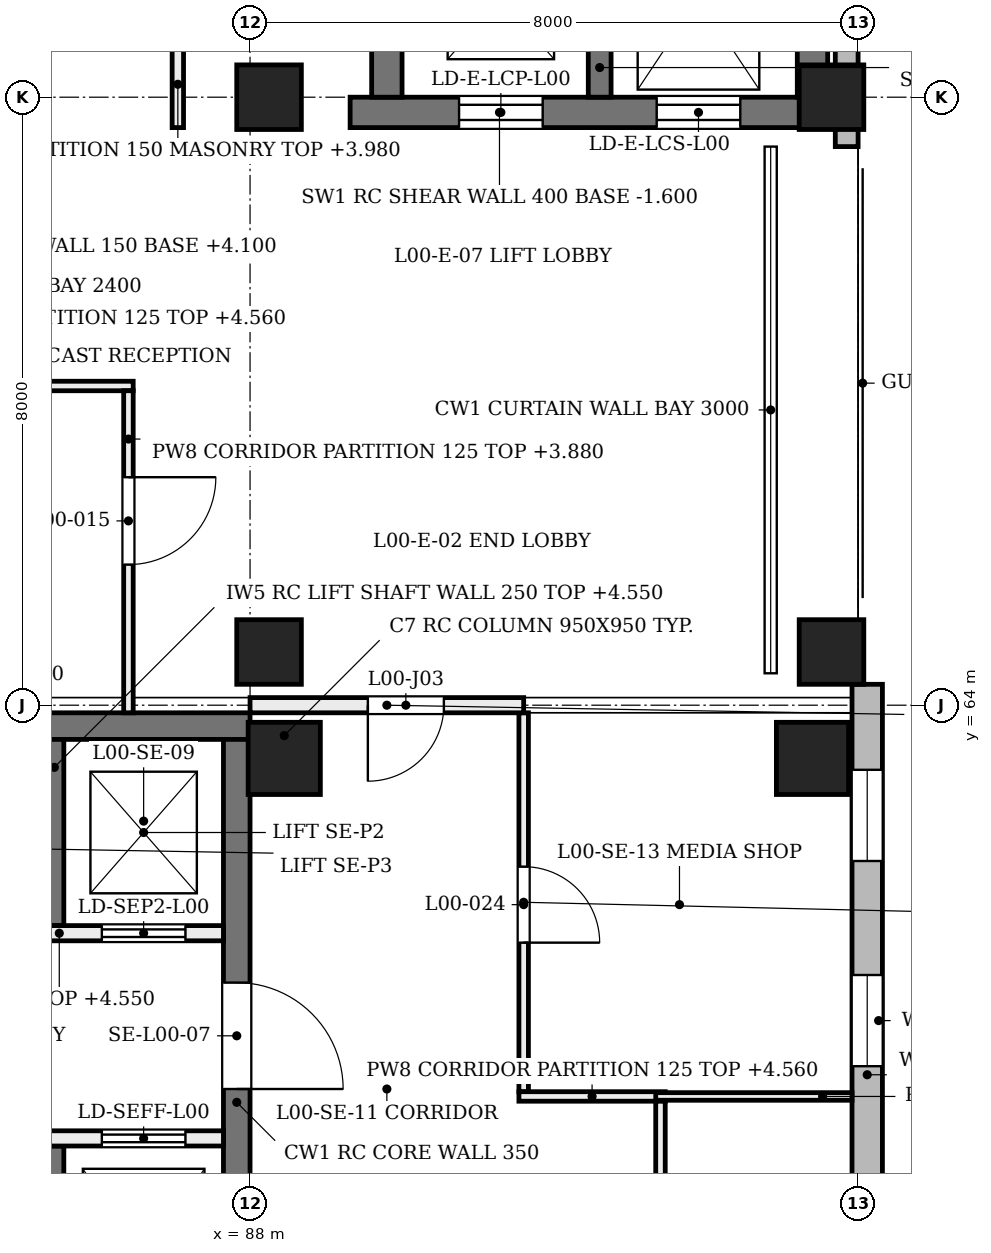
"""IFC4 building model, lengths in metres.
Left out: names, types, materials, properties, quantities, classifications, styles, units other than length and angle.
Written with IfcOpenShell. Run it as: python <this file> out.ifc"""

import sys

from ifc_helpers import new_model, si_unit, direction, frame, frame_2d, origin, origin_2d, place, context, subcontext, project, spatial, rectangle, extrude, element, fill, save


model = new_model("IFC4")
c1 = context("Model", 3, precision=1e-05, world=origin(), true_north=direction((0.0, 1.0)))
c2 = subcontext(c1, "Body", "Model", "MODEL_VIEW")
j1 = project(units=[si_unit("LENGTHUNIT", "METRE"), si_unit("PLANEANGLEUNIT", "RADIAN")], contexts=[c1])
p1 = place(None, origin())
s1 = spatial("IfcSite", under=j1, at=p1, CompositionType="ELEMENT")
p2 = place(p1, origin())
s2 = spatial("IfcBuilding", under=s1, at=p2, CompositionType="ELEMENT")
p3 = place(p2, origin())
s3 = spatial("IfcBuildingStorey", under=s2, at=p3, CompositionType="ELEMENT", Elevation=0.0)
p4 = place(p3, frame((89.317, 71.8, -1.6), z_axis=(0.0, 0.0, 1.0), x_axis=(1.0, 0.0, 0.0)))
e1 = element("IfcWall", 1, at=p4, inside=s3, PredefinedType="SHEAR", context=c2, shape_type="SweptSolid", body=[
    extrude(rectangle(XDim=6.55, YDim=0.4, at=frame_2d((3.275, 0.0))), origin(), (0.0, 0.0, 1.0), 6.18),
])
p5 = place(p4, frame((1.433, 0.0, 1.6)))
e2 = element("IfcOpeningElement", 2, at=p5, cuts=e1, PredefinedType="OPENING", context=c2, shape_type="SweptSolid", body=[
    extrude(rectangle(XDim=1.1, YDim=2.1, at=frame_2d((0.55, 1.05))), frame((0.0, 0.21, 0.0), z_axis=(0.0, -1.0, 0.0), x_axis=(1.0, 0.0, 0.0)), (0.0, 0.0, 1.0), 0.42),
])
p6 = place(p4, frame((4.033, 0.0, 1.6)))
e3 = element("IfcOpeningElement", 3, at=p6, cuts=e1, PredefinedType="OPENING", context=c2, shape_type="SweptSolid", body=[
    extrude(rectangle(XDim=1.1, YDim=2.1, at=frame_2d((0.55, 1.05))), frame((0.0, 0.21, 0.0), z_axis=(0.0, -1.0, 0.0), x_axis=(1.0, 0.0, 0.0)), (0.0, 0.0, 1.0), 0.42),
])
for number, where, z_axis, x_axis in (
    (4, (89.8, 72.0, -1.6), (0.0, 0.0, 1.0), (0.0, 1.0, 0.0)),
    (5, (95.4, 72.0, -1.6), (0.0, 0.0, 1.0), (0.0, 1.0, 0.0)),
):
    element("IfcWall", number, at=place(p3, frame(where, z_axis=z_axis, x_axis=x_axis)), inside=s3, PredefinedType="SHEAR", context=c2, shape_type="SweptSolid", body=[
        extrude(rectangle(XDim=2.6, YDim=0.4, at=frame_2d((1.3, 0.0))), origin(), (0.0, 0.0, 1.0), 6.18),
    ])
p7 = place(p3, frame((92.6, 72.0, -1.6), z_axis=(0.0, 0.0, 1.0), x_axis=(0.0, 1.0, 0.0)))
e6 = element("IfcWall", 6, at=p7, inside=s3, PredefinedType="SHEAR", context=c2, shape_type="SweptSolid", body=[
    extrude(rectangle(XDim=2.6, YDim=0.3, at=frame_2d((1.3, 0.0))), origin(), (0.0, 0.0, 1.0), 6.18),
])
p8 = place(p3, frame((79.725, 63.725, 0.0), z_axis=(0.0, 0.0, 1.0), x_axis=(1.0, 0.0, 0.0)))
e7 = element("IfcWall", 7, at=p8, inside=s3, PredefinedType="SHEAR", context=c2, shape_type="SweptSolid", body=[
    extrude(rectangle(XDim=8.275, YDim=0.35, at=frame_2d((4.137, 0.0))), origin(), (0.0, 0.0, 1.0), 4.58),
])
p9 = place(p3, frame((87.825, 48.35, 0.0), z_axis=(0.0, 0.0, 1.0), x_axis=(0.0, 1.0, 0.0)))
e8 = element("IfcWall", 8, at=p9, inside=s3, PredefinedType="SHEAR", context=c2, shape_type="SweptSolid", body=[
    extrude(rectangle(XDim=15.2, YDim=0.35, at=frame_2d((7.6, 0.0))), origin(), (0.0, 0.0, 1.0), 4.58),
])
p10 = place(p9, frame((0.95, 0.0, 0.0)))
e9 = element("IfcOpeningElement", 9, at=p10, cuts=e8, PredefinedType="OPENING", context=c2, shape_type="SweptSolid", body=[
    extrude(rectangle(XDim=1.0, YDim=2.1, at=frame_2d((0.5, 1.05))), frame((0.0, 0.185, 0.0), z_axis=(0.0, -1.0, 0.0), x_axis=(1.0, 0.0, 0.0)), (0.0, 0.0, 1.0), 0.37),
])
p11 = place(p9, frame((10.6, 0.0, 0.0)))
e10 = element("IfcOpeningElement", 10, at=p11, cuts=e8, PredefinedType="OPENING", context=c2, shape_type="SweptSolid", body=[
    extrude(rectangle(XDim=1.4, YDim=2.1, at=frame_2d((0.7, 1.05))), frame((0.0, 0.185, 0.0), z_axis=(0.0, -1.0, 0.0), x_axis=(1.0, 0.0, 0.0)), (0.0, 0.0, 1.0), 0.37),
])
for number, where, z_axis, x_axis in (
    (11, (88.45, 63.3, 0.0), (0.0, 0.0, 1.0), (1.0, 0.0, 0.0)),
    (12, (95.4, 63.3, 0.0), (0.0, 0.0, 1.0), (1.0, 0.0, 0.0)),
):
    element("IfcColumn", number, at=place(p3, frame(where, z_axis=z_axis, x_axis=x_axis)), inside=s3, PredefinedType="COLUMN", context=c2, shape_type="SweptSolid", body=[
        extrude(rectangle(XDim=0.95, YDim=0.95, at=origin_2d()), origin(), (0.0, 0.0, 1.0), 4.8),
    ])
for number, where, z_axis, x_axis in (
    (13, (87.667, 64.7, -1.6), (0.204, 0.0, 0.979), (0.0, 1.0, 0.0)),
    (14, (87.667, 72.0, -1.6), (0.204, 0.0, 0.979), (0.0, 1.0, 0.0)),
    (15, (95.067, 64.7, -1.6), (0.204, 0.0, 0.979), (0.0, 1.0, 0.0)),
    (16, (95.067, 72.0, -1.6), (0.204, 0.0, 0.979), (0.0, 1.0, 0.0)),
):
    element("IfcColumn", number, at=place(p3, frame(where, z_axis=z_axis, x_axis=x_axis)), inside=s3, PredefinedType="COLUMN", context=c2, shape_type="SweptSolid", body=[
        extrude(rectangle(XDim=0.85, YDim=0.85, at=origin_2d()), origin(), (0.0, 0.0, 1.0), 6.538),
    ])
p12 = place(p3, frame((95.85, 71.35, 0.0), z_axis=(0.0, 0.0, 1.0), x_axis=(0.0, 1.0, 0.0)))
e17 = element("IfcWall", 17, at=p12, inside=s3, PredefinedType="SOLIDWALL", context=c2, shape_type="SweptSolid", body=[
    extrude(rectangle(XDim=20.7, YDim=0.3, at=frame_2d((10.35, 0.0))), origin(), (0.0, 0.0, 1.0), 3.9),
])
p13 = place(p3, frame((96.12, 47.7, 0.0), z_axis=(0.0, 0.0, 1.0), x_axis=(0.0, 1.0, 0.0)))
e18 = element("IfcWall", 18, at=p13, inside=s3, PredefinedType="SOLIDWALL", context=c2, shape_type="SweptSolid", body=[
    extrude(rectangle(XDim=16.575, YDim=0.4, at=frame_2d((8.288, 0.0))), origin(), (0.0, 0.0, 1.0), 3.9),
])
p14 = place(p13, frame((0.75, 0.0, 1.9)))
e19 = element("IfcOpeningElement", 19, at=p14, cuts=e18, PredefinedType="OPENING", context=c2, shape_type="SweptSolid", body=[
    extrude(rectangle(XDim=1.2, YDim=1.5, at=frame_2d((0.6, 0.75))), frame((0.0, 0.21, 0.0), z_axis=(0.0, -1.0, 0.0), x_axis=(1.0, 0.0, 0.0)), (0.0, 0.0, 1.0), 0.42),
])
p15 = place(p13, frame((3.45, 0.0, 1.9)))
e20 = element("IfcOpeningElement", 20, at=p15, cuts=e18, PredefinedType="OPENING", context=c2, shape_type="SweptSolid", body=[
    extrude(rectangle(XDim=1.2, YDim=1.5, at=frame_2d((0.6, 0.75))), frame((0.0, 0.21, 0.0), z_axis=(0.0, -1.0, 0.0), x_axis=(1.0, 0.0, 0.0)), (0.0, 0.0, 1.0), 0.42),
])
p16 = place(p13, frame((6.15, 0.0, 1.9)))
e21 = element("IfcOpeningElement", 21, at=p16, cuts=e18, PredefinedType="OPENING", context=c2, shape_type="SweptSolid", body=[
    extrude(rectangle(XDim=1.2, YDim=1.5, at=frame_2d((0.6, 0.75))), frame((0.0, 0.21, 0.0), z_axis=(0.0, -1.0, 0.0), x_axis=(1.0, 0.0, 0.0)), (0.0, 0.0, 1.0), 0.42),
])
p17 = place(p13, frame((8.85, 0.0, 1.9)))
e22 = element("IfcOpeningElement", 22, at=p17, cuts=e18, PredefinedType="OPENING", context=c2, shape_type="SweptSolid", body=[
    extrude(rectangle(XDim=1.2, YDim=1.5, at=frame_2d((0.6, 0.75))), frame((0.0, 0.21, 0.0), z_axis=(0.0, -1.0, 0.0), x_axis=(1.0, 0.0, 0.0)), (0.0, 0.0, 1.0), 0.42),
])
p18 = place(p13, frame((11.55, 0.0, 1.9)))
e23 = element("IfcOpeningElement", 23, at=p18, cuts=e18, PredefinedType="OPENING", context=c2, shape_type="SweptSolid", body=[
    extrude(rectangle(XDim=1.2, YDim=1.5, at=frame_2d((0.6, 0.75))), frame((0.0, 0.21, 0.0), z_axis=(0.0, -1.0, 0.0), x_axis=(1.0, 0.0, 0.0)), (0.0, 0.0, 1.0), 0.42),
])
p19 = place(p13, frame((14.25, 0.0, 1.9)))
e24 = element("IfcOpeningElement", 24, at=p19, cuts=e18, PredefinedType="OPENING", context=c2, shape_type="SweptSolid", body=[
    extrude(rectangle(XDim=1.2, YDim=1.5, at=frame_2d((0.6, 0.75))), frame((0.0, 0.21, 0.0), z_axis=(0.0, -1.0, 0.0), x_axis=(1.0, 0.0, 0.0)), (0.0, 0.0, 1.0), 0.42),
])
p20 = place(p3, frame((85.425, 55.2, 0.0), z_axis=(0.0, 0.0, 1.0), x_axis=(0.0, 1.0, 0.0)))
e25 = element("IfcWall", 25, at=p20, inside=s3, PredefinedType="SOLIDWALL", context=c2, shape_type="SweptSolid", body=[
    extrude(rectangle(XDim=3.0, YDim=0.25, at=frame_2d((1.5, 0.0))), origin(), (0.0, 0.0, 1.0), 4.55),
])
p21 = place(p3, frame((85.425, 61.1, 0.0), z_axis=(0.0, 0.0, 1.0), x_axis=(0.0, 1.0, 0.0)))
e26 = element("IfcWall", 26, at=p21, inside=s3, PredefinedType="SOLIDWALL", context=c2, shape_type="SweptSolid", body=[
    extrude(rectangle(XDim=2.45, YDim=0.25, at=frame_2d((1.225, 0.0))), origin(), (0.0, 0.0, 1.0), 4.55),
])
p22 = place(p3, frame((87.65, 58.3, 0.0), z_axis=(0.0, 0.0, 1.0), x_axis=(-1.0, 0.0, 0.0)))
e27 = element("IfcWall", 27, at=p22, inside=s3, PredefinedType="SOLIDWALL", context=c2, shape_type="SweptSolid", body=[
    extrude(rectangle(XDim=7.2, YDim=0.2, at=frame_2d((3.6, 0.0))), origin(), (0.0, 0.0, 1.0), 4.55),
])
p23 = place(p22, frame((0.5, 0.0, 0.0)))
e28 = element("IfcOpeningElement", 28, at=p23, cuts=e27, PredefinedType="OPENING", context=c2, shape_type="SweptSolid", body=[
    extrude(rectangle(XDim=1.1, YDim=2.1, at=frame_2d((0.55, 1.05))), frame((0.0, 0.11, 0.0), z_axis=(0.0, -1.0, 0.0), x_axis=(1.0, 0.0, 0.0)), (0.0, 0.0, 1.0), 0.22),
])
p24 = place(p22, frame((5.6, 0.0, 0.0)))
e29 = element("IfcOpeningElement", 29, at=p24, cuts=e27, PredefinedType="OPENING", context=c2, shape_type="SweptSolid", body=[
    extrude(rectangle(XDim=1.1, YDim=2.1, at=frame_2d((0.55, 1.05))), frame((0.0, 0.11, 0.0), z_axis=(0.0, -1.0, 0.0), x_axis=(1.0, 0.0, 0.0)), (0.0, 0.0, 1.0), 0.22),
])
p25 = place(p22, frame((3.1, 0.0, 0.0)))
e30 = element("IfcOpeningElement", 30, at=p25, cuts=e27, PredefinedType="OPENING", context=c2, shape_type="SweptSolid", body=[
    extrude(rectangle(XDim=1.0, YDim=2.1, at=frame_2d((0.5, 1.05))), frame((0.0, 0.11, 0.0), z_axis=(0.0, -1.0, 0.0), x_axis=(1.0, 0.0, 0.0)), (0.0, 0.0, 1.0), 0.22),
])
p26 = place(p3, frame((87.65, 61.0, 0.0), z_axis=(0.0, 0.0, 1.0), x_axis=(-1.0, 0.0, 0.0)))
e31 = element("IfcWall", 31, at=p26, inside=s3, PredefinedType="SOLIDWALL", context=c2, shape_type="SweptSolid", body=[
    extrude(rectangle(XDim=7.2, YDim=0.2, at=frame_2d((3.6, 0.0))), origin(), (0.0, 0.0, 1.0), 4.55),
])
p27 = place(p26, frame((0.5, 0.0, 0.0)))
e32 = element("IfcOpeningElement", 32, at=p27, cuts=e31, PredefinedType="OPENING", context=c2, shape_type="SweptSolid", body=[
    extrude(rectangle(XDim=1.1, YDim=2.1, at=frame_2d((0.55, 1.05))), frame((0.0, 0.11, 0.0), z_axis=(0.0, -1.0, 0.0), x_axis=(1.0, 0.0, 0.0)), (0.0, 0.0, 1.0), 0.22),
])
p28 = place(p26, frame((5.6, 0.0, 0.0)))
e33 = element("IfcOpeningElement", 33, at=p28, cuts=e31, PredefinedType="OPENING", context=c2, shape_type="SweptSolid", body=[
    extrude(rectangle(XDim=1.1, YDim=2.1, at=frame_2d((0.55, 1.05))), frame((0.0, 0.11, 0.0), z_axis=(0.0, -1.0, 0.0), x_axis=(1.0, 0.0, 0.0)), (0.0, 0.0, 1.0), 0.22),
])
p29 = place(p26, frame((3.1, 0.0, 0.0)))
e34 = element("IfcOpeningElement", 34, at=p29, cuts=e31, PredefinedType="OPENING", context=c2, shape_type="SweptSolid", body=[
    extrude(rectangle(XDim=1.0, YDim=2.1, at=frame_2d((0.5, 1.05))), frame((0.0, 0.11, 0.0), z_axis=(0.0, -1.0, 0.0), x_axis=(1.0, 0.0, 0.0)), (0.0, 0.0, 1.0), 0.22),
])
p30 = place(p3, frame((82.23, 68.2, 0.0), z_axis=(0.0, 0.0, 1.0), x_axis=(1.0, 0.0, 0.0)))
e35 = element("IfcWall", 35, at=p30, inside=s3, PredefinedType="PARTITIONING", context=c2, shape_type="SweptSolid", body=[
    extrude(rectangle(XDim=4.232, YDim=0.125, at=frame_2d((2.116, 0.0))), origin(), (0.0, 0.0, 1.0), 4.56),
])
p31 = place(p3, frame((86.4, 63.9, 0.0), z_axis=(0.0, 0.0, 1.0), x_axis=(0.0, 1.0, 0.0)))
e36 = element("IfcWall", 36, at=p31, inside=s3, PredefinedType="PARTITIONING", context=c2, shape_type="SweptSolid", body=[
    extrude(rectangle(XDim=4.238, YDim=0.125, at=frame_2d((2.119, 0.0))), origin(), (0.0, 0.0, 1.0), 3.88),
])
p32 = place(p31, frame((1.95, 0.0, 0.0)))
e37 = element("IfcOpeningElement", 37, at=p32, cuts=e36, PredefinedType="OPENING", context=c2, shape_type="SweptSolid", body=[
    extrude(rectangle(XDim=1.15, YDim=2.1, at=frame_2d((0.575, 1.05))), frame((0.0, 0.073, 0.0), z_axis=(0.0, -1.0, 0.0), x_axis=(1.0, 0.0, 0.0)), (0.0, 0.0, 1.0), 0.145),
])
p33 = place(p3, frame((87.05, 71.6, 0.0), z_axis=(0.0, 0.0, 1.0), x_axis=(0.0, 1.0, 0.0)))
e38 = element("IfcWall", 38, at=p33, inside=s3, PredefinedType="PARTITIONING", context=c2, shape_type="SweptSolid", body=[
    extrude(rectangle(XDim=3.8, YDim=0.15, at=frame_2d((1.9, 0.0))), origin(), (0.0, 0.0, 1.0), 3.98),
])
p34 = place(p33, frame((1.225, 0.0, 0.0)))
e39 = element("IfcOpeningElement", 39, at=p34, cuts=e38, PredefinedType="OPENING", context=c2, shape_type="SweptSolid", body=[
    extrude(rectangle(XDim=0.95, YDim=2.1, at=frame_2d((0.475, 1.05))), frame((0.0, 0.085, 0.0), z_axis=(0.0, -1.0, 0.0), x_axis=(1.0, 0.0, 0.0)), (0.0, 0.0, 1.0), 0.17),
])
p35 = place(p3, frame((91.6, 58.914, 0.0), z_axis=(0.0, 0.0, 1.0), x_axis=(0.0, 1.0, 0.0)))
e40 = element("IfcWall", 40, at=p35, inside=s3, PredefinedType="PARTITIONING", context=c2, shape_type="SweptSolid", body=[
    extrude(rectangle(XDim=4.986, YDim=0.125, at=frame_2d((2.493, 0.0))), origin(), (0.0, 0.0, 1.0), 3.88),
])
p36 = place(p35, frame((1.962, 0.0, 0.0)))
e41 = element("IfcOpeningElement", 41, at=p36, cuts=e40, PredefinedType="OPENING", context=c2, shape_type="SweptSolid", body=[
    extrude(rectangle(XDim=1.0, YDim=2.1, at=frame_2d((0.5, 1.05))), frame((0.0, 0.073, 0.0), z_axis=(0.0, -1.0, 0.0), x_axis=(1.0, 0.0, 0.0)), (0.0, 0.0, 1.0), 0.145),
])
p37 = place(p3, frame((91.538, 58.852, 0.0), z_axis=(0.0, 0.0, 1.0), x_axis=(1.0, 0.0, 0.0)))
e42 = element("IfcWall", 42, at=p37, inside=s3, PredefinedType="PARTITIONING", context=c2, shape_type="SweptSolid", body=[
    extrude(rectangle(XDim=1.925, YDim=0.125, at=frame_2d((0.962, 0.0))), origin(), (0.0, 0.0, 1.0), 4.56),
])
p38 = place(p3, frame((93.337, 58.852, 0.0), z_axis=(0.0, 0.0, 1.0), x_axis=(1.0, 0.0, 0.0)))
e43 = element("IfcWall", 43, at=p38, inside=s3, PredefinedType="PARTITIONING", context=c2, shape_type="SweptSolid", body=[
    extrude(rectangle(XDim=2.583, YDim=0.1, at=frame_2d((1.291, 0.0))), origin(), (0.0, 0.0, 1.0), 3.88),
])
p39 = place(p3, frame((93.4, 52.654, 0.0), z_axis=(0.0, 0.0, 1.0), x_axis=(0.0, 1.0, 0.0)))
e44 = element("IfcWall", 44, at=p39, inside=s3, PredefinedType="PARTITIONING", context=c2, shape_type="SweptSolid", body=[
    extrude(rectangle(XDim=6.135, YDim=0.125, at=frame_2d((3.068, 0.0))), origin(), (0.0, 0.0, 1.0), 3.98),
])
p40 = place(p39, frame((1.052, 0.0, 0.0)))
e45 = element("IfcOpeningElement", 45, at=p40, cuts=e44, PredefinedType="OPENING", context=c2, shape_type="SweptSolid", body=[
    extrude(rectangle(XDim=0.9, YDim=2.1, at=frame_2d((0.45, 1.05))), frame((0.0, 0.073, 0.0), z_axis=(0.0, -1.0, 0.0), x_axis=(1.0, 0.0, 0.0)), (0.0, 0.0, 1.0), 0.145),
])
p41 = place(p39, frame((4.183, 0.0, 0.0)))
e46 = element("IfcOpeningElement", 46, at=p41, cuts=e44, PredefinedType="OPENING", context=c2, shape_type="SweptSolid", body=[
    extrude(rectangle(XDim=0.9, YDim=2.1, at=frame_2d((0.45, 1.05))), frame((0.0, 0.073, 0.0), z_axis=(0.0, -1.0, 0.0), x_axis=(1.0, 0.0, 0.0)), (0.0, 0.0, 1.0), 0.145),
])
p42 = place(p3, frame((88.0, 64.0, 0.0), z_axis=(0.0, 0.0, 1.0), x_axis=(1.0, 0.0, 0.0)))
e47 = element("IfcWall", 47, at=p42, inside=s3, PredefinedType="PARTITIONING", context=c2, shape_type="SweptSolid", body=[
    extrude(rectangle(XDim=3.6, YDim=0.2, at=frame_2d((1.8, 0.0))), origin(), (0.0, 0.0, 1.0), 3.88),
])
p43 = place(p42, frame((1.55, 0.0, 0.0)))
e48 = element("IfcOpeningElement", 48, at=p43, cuts=e47, PredefinedType="OPENING", context=c2, shape_type="SweptSolid", body=[
    extrude(rectangle(XDim=1.0, YDim=2.1, at=frame_2d((0.5, 1.05))), frame((0.0, 0.11, 0.0), z_axis=(0.0, -1.0, 0.0), x_axis=(1.0, 0.0, 0.0)), (0.0, 0.0, 1.0), 0.22),
])
p44 = place(p18, origin())
e49 = element("IfcWindow", 49, at=p44, inside=s3, PartitioningType="SINGLE_PANEL", PredefinedType="WINDOW", context=c2, shape_type="SweptSolid", body=[
    extrude(rectangle(XDim=1.2, YDim=1.5, at=frame_2d((0.6, 0.75))), frame((0.0, 0.03, 0.0), z_axis=(0.0, -1.0, 0.0), x_axis=(1.0, 0.0, 0.0)), (0.0, 0.0, 1.0), 0.06),
])
fill(e23, e49)
p45 = place(p19, origin())
e50 = element("IfcWindow", 50, at=p45, inside=s3, PartitioningType="SINGLE_PANEL", PredefinedType="WINDOW", context=c2, shape_type="SweptSolid", body=[
    extrude(rectangle(XDim=1.2, YDim=1.5, at=frame_2d((0.6, 0.75))), frame((0.0, 0.03, 0.0), z_axis=(0.0, -1.0, 0.0), x_axis=(1.0, 0.0, 0.0)), (0.0, 0.0, 1.0), 0.06),
])
fill(e24, e50)
p46 = place(p23, frame((1.1, 0.0, 0.0), z_axis=(0.0, 0.0, 1.0), x_axis=(-1.0, 0.0, 0.0)))
e51 = element("IfcDoor", 51, at=p46, inside=s3, OperationType="DOUBLE_DOOR_SLIDING", PredefinedType="DOOR", context=c2, shape_type="SweptSolid", body=[
    extrude(rectangle(XDim=1.1, YDim=2.1, at=frame_2d((0.55, 1.05))), frame((0.0, 0.025, 0.0), z_axis=(0.0, -1.0, 0.0), x_axis=(1.0, 0.0, 0.0)), (0.0, 0.0, 1.0), 0.05),
])
fill(e28, e51)
p47 = place(p27, origin())
e52 = element("IfcDoor", 52, at=p47, inside=s3, OperationType="DOUBLE_DOOR_SLIDING", PredefinedType="DOOR", context=c2, shape_type="SweptSolid", body=[
    extrude(rectangle(XDim=1.1, YDim=2.1, at=frame_2d((0.55, 1.05))), frame((0.0, 0.025, 0.0), z_axis=(0.0, -1.0, 0.0), x_axis=(1.0, 0.0, 0.0)), (0.0, 0.0, 1.0), 0.05),
])
fill(e32, e52)
p48 = place(p11, frame((1.4, 0.0, 0.0), z_axis=(0.0, 0.0, 1.0), x_axis=(-1.0, 0.0, 0.0)))
e53 = element("IfcDoor", 53, at=p48, inside=s3, OperationType="SINGLE_SWING_LEFT", PredefinedType="DOOR", context=c2, shape_type="SweptSolid", body=[
    extrude(rectangle(XDim=1.4, YDim=2.1, at=frame_2d((0.7, 1.05))), frame((0.0, 0.025, 0.0), z_axis=(0.0, -1.0, 0.0), x_axis=(1.0, 0.0, 0.0)), (0.0, 0.0, 1.0), 0.05),
])
fill(e10, e53)
p49 = place(p5, frame((1.1, 0.0, 0.0), z_axis=(0.0, 0.0, 1.0), x_axis=(-1.0, 0.0, 0.0)))
e54 = element("IfcDoor", 54, at=p49, inside=s3, OperationType="DOUBLE_DOOR_SLIDING", PredefinedType="DOOR", context=c2, shape_type="SweptSolid", body=[
    extrude(rectangle(XDim=1.1, YDim=2.1, at=frame_2d((0.55, 1.05))), frame((0.0, 0.025, 0.0), z_axis=(0.0, -1.0, 0.0), x_axis=(1.0, 0.0, 0.0)), (0.0, 0.0, 1.0), 0.05),
])
fill(e2, e54)
p50 = place(p6, frame((1.1, 0.0, 0.0), z_axis=(0.0, 0.0, 1.0), x_axis=(-1.0, 0.0, 0.0)))
e55 = element("IfcDoor", 55, at=p50, inside=s3, OperationType="DOUBLE_DOOR_SLIDING", PredefinedType="DOOR", context=c2, shape_type="SweptSolid", body=[
    extrude(rectangle(XDim=1.1, YDim=2.1, at=frame_2d((0.55, 1.05))), frame((0.0, 0.025, 0.0), z_axis=(0.0, -1.0, 0.0), x_axis=(1.0, 0.0, 0.0)), (0.0, 0.0, 1.0), 0.05),
])
fill(e3, e55)
p51 = place(p32, origin())
e56 = element("IfcDoor", 56, at=p51, inside=s3, OperationType="SINGLE_SWING_RIGHT", PredefinedType="DOOR", context=c2, shape_type="SweptSolid", body=[
    extrude(rectangle(XDim=1.15, YDim=2.1, at=frame_2d((0.575, 1.05))), frame((0.0, 0.025, 0.0), z_axis=(0.0, -1.0, 0.0), x_axis=(1.0, 0.0, 0.0)), (0.0, 0.0, 1.0), 0.05),
])
fill(e37, e56)
p52 = place(p36, frame((1.0, 0.0, 0.0), z_axis=(0.0, 0.0, 1.0), x_axis=(-1.0, 0.0, 0.0)))
e57 = element("IfcDoor", 57, at=p52, inside=s3, OperationType="SINGLE_SWING_LEFT", PredefinedType="DOOR", context=c2, shape_type="SweptSolid", body=[
    extrude(rectangle(XDim=1.0, YDim=2.1, at=frame_2d((0.5, 1.05))), frame((0.0, 0.025, 0.0), z_axis=(0.0, -1.0, 0.0), x_axis=(1.0, 0.0, 0.0)), (0.0, 0.0, 1.0), 0.05),
])
fill(e41, e57)
p53 = place(p43, frame((1.0, 0.0, 0.0), z_axis=(0.0, 0.0, 1.0), x_axis=(-1.0, 0.0, 0.0)))
e58 = element("IfcDoor", 58, at=p53, inside=s3, OperationType="SINGLE_SWING_LEFT", PredefinedType="DOOR", context=c2, shape_type="SweptSolid", body=[
    extrude(rectangle(XDim=1.0, YDim=2.1, at=frame_2d((0.5, 1.05))), frame((0.0, 0.025, 0.0), z_axis=(0.0, -1.0, 0.0), x_axis=(1.0, 0.0, 0.0)), (0.0, 0.0, 1.0), 0.05),
])
fill(e48, e58)
save(model, sys.argv[1])
